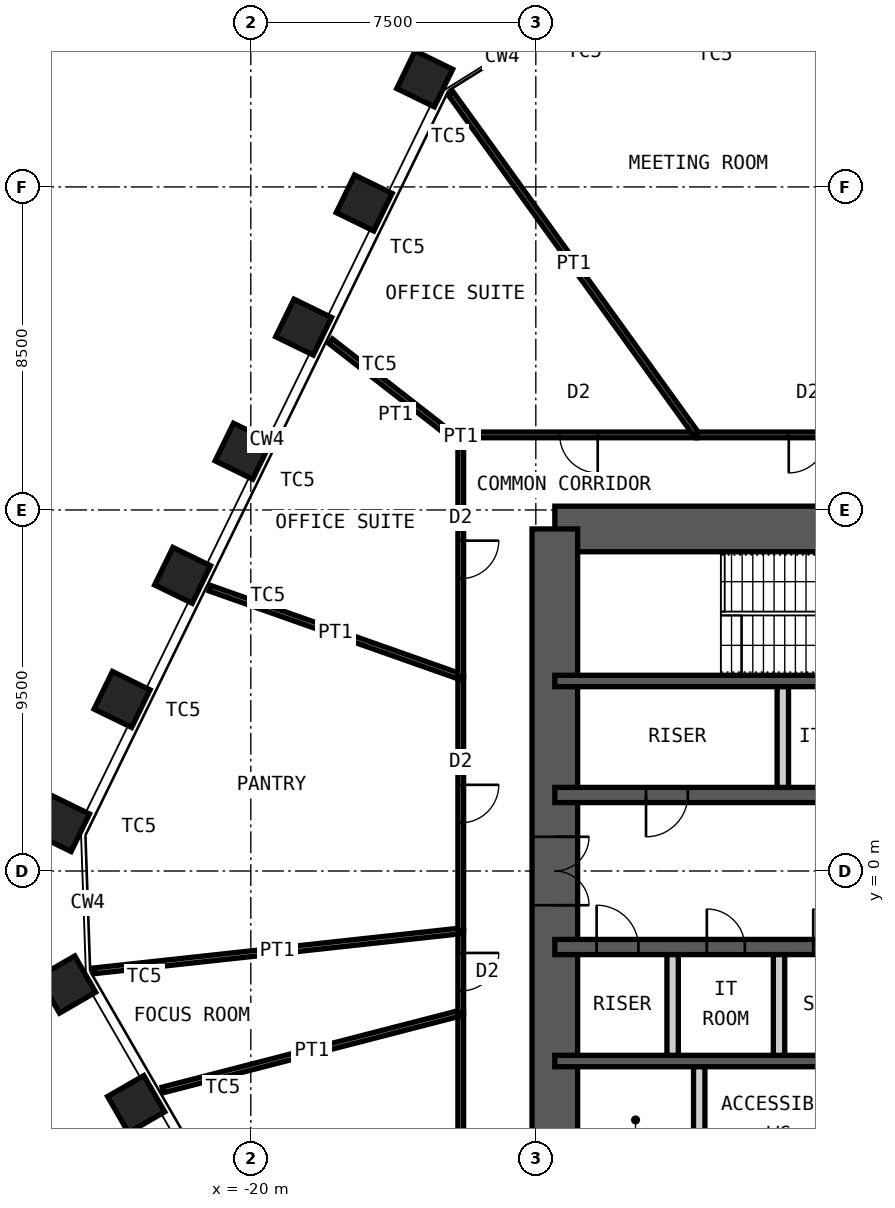
"""IFC4 building model, lengths in metres.
Left out: names, types, materials, properties, quantities, classifications, styles, units other than length and angle.
Written with IfcOpenShell. Run it as: python <this file> out.ifc"""

import sys

from ifc_helpers import new_model, si_unit, direction, frame, frame_2d, origin, origin_2d, place, context, subcontext, project, spatial, rectangle, hollow_rectangle, extrude, element, fill, save


model = new_model("IFC4")
c1 = context("Model", 3, precision=1e-05, world=origin(), true_north=direction((0.0, 1.0)))
c2 = subcontext(c1, "Body", "Model", "MODEL_VIEW")
j1 = project(units=[si_unit("LENGTHUNIT", "METRE"), si_unit("PLANEANGLEUNIT", "RADIAN")], contexts=[c1])
p1 = place(None, origin())
s1 = spatial("IfcSite", under=j1, at=p1, CompositionType="ELEMENT")
p2 = place(p1, origin())
s2 = spatial("IfcBuilding", under=s1, at=p2, CompositionType="ELEMENT")
p3 = place(p2, frame((0.0, 0.0, 201.4)))
s3 = spatial("IfcBuildingStorey", under=s2, at=p3, CompositionType="ELEMENT", Elevation=201.4)
for number, where, z_axis, x_axis in (
    (1, (-23.016, -6.134, 0.0), (0.0, 0.0, 1.0), (0.5, -0.866, 0.0)),
    (2, (-24.833, -2.988, 0.0), (0.0, 0.0, 1.0), (0.5, -0.866, 0.0)),
    (3, (-24.981, 1.248, 0.0), (0.0, 0.0, 1.0), (-0.438, -0.899, 0.0)),
    (4, (-23.388, 4.514, 0.0), (0.0, 0.0, 1.0), (-0.438, -0.899, 0.0)),
    (5, (-21.795, 7.78, 0.0), (0.0, 0.0, 1.0), (-0.438, -0.899, 0.0)),
    (6, (-20.203, 11.045, 0.0), (0.0, 0.0, 1.0), (-0.438, -0.899, 0.0)),
    (7, (-18.61, 14.311, 0.0), (0.0, 0.0, 1.0), (-0.438, -0.899, 0.0)),
    (8, (-17.017, 17.577, 0.0), (0.0, 0.0, 1.0), (-0.438, -0.899, 0.0)),
    (9, (-15.424, 20.843, 0.0), (0.0, 0.0, 1.0), (-0.438, -0.899, 0.0)),
):
    element("IfcColumn", number, at=place(p3, frame(where, z_axis=z_axis, x_axis=x_axis)), inside=s3, PredefinedType="COLUMN", context=c2, shape_type="SweptSolid", body=[
        extrude(hollow_rectangle(XDim=1.1, YDim=1.1, WallThickness=0.07, at=origin_2d()), origin(), (0.0, 0.0, 1.0), 4.2),
    ])
p4 = place(p3, frame((-12.0, 9.0, 0.0), z_axis=(0.0, 0.0, 1.0), x_axis=(1.0, 0.0, 0.0)))
e10 = element("IfcWall", 10, at=p4, inside=s3, PredefinedType="SHEAR", context=c2, shape_type="SweptSolid", body=[
    extrude(rectangle(XDim=24.0, YDim=1.2, at=frame_2d((12.0, 0.0))), origin(), (0.0, 0.0, 1.0), 4.2),
])
p5 = place(p4, frame((10.4, 0.0, 0.0)))
e11 = element("IfcOpeningElement", 11, at=p5, cuts=e10, PredefinedType="OPENING", context=c2, shape_type="SweptSolid", body=[
    extrude(rectangle(XDim=1.0, YDim=2.1, at=frame_2d((0.5, 1.05))), frame((0.0, 0.61, 0.0), z_axis=(0.0, -1.0, 0.0), x_axis=(1.0, 0.0, 0.0)), (0.0, 0.0, 1.0), 1.22),
])
p6 = place(p4, frame((17.6, 0.0, 0.0)))
e12 = element("IfcOpeningElement", 12, at=p6, cuts=e10, PredefinedType="OPENING", context=c2, shape_type="SweptSolid", body=[
    extrude(rectangle(XDim=0.9, YDim=2.1, at=frame_2d((0.45, 1.05))), frame((0.0, 0.61, 0.0), z_axis=(0.0, -1.0, 0.0), x_axis=(1.0, 0.0, 0.0)), (0.0, 0.0, 1.0), 1.22),
])
p7 = place(p4, frame((21.9, 0.0, 0.0)))
e13 = element("IfcOpeningElement", 13, at=p7, cuts=e10, PredefinedType="OPENING", context=c2, shape_type="SweptSolid", body=[
    extrude(rectangle(XDim=0.9, YDim=2.1, at=frame_2d((0.45, 1.05))), frame((0.0, 0.61, 0.0), z_axis=(0.0, -1.0, 0.0), x_axis=(1.0, 0.0, 0.0)), (0.0, 0.0, 1.0), 1.22),
])
p8 = place(p3, frame((-12.0, -9.0, 0.0), z_axis=(0.0, 0.0, 1.0), x_axis=(0.0, 1.0, 0.0)))
e14 = element("IfcWall", 14, at=p8, inside=s3, PredefinedType="SHEAR", context=c2, shape_type="SweptSolid", body=[
    extrude(rectangle(XDim=18.0, YDim=1.2, at=frame_2d((9.0, 0.0))), origin(), (0.0, 0.0, 1.0), 4.2),
])
p9 = place(p8, frame((8.1, 0.0, 0.0)))
e15 = element("IfcOpeningElement", 15, at=p9, cuts=e14, PredefinedType="OPENING", context=c2, shape_type="SweptSolid", body=[
    extrude(rectangle(XDim=1.8, YDim=2.1, at=frame_2d((0.9, 1.05))), frame((0.0, 0.61, 0.0), z_axis=(0.0, -1.0, 0.0), x_axis=(1.0, 0.0, 0.0)), (0.0, 0.0, 1.0), 1.22),
])
p10 = place(p3, frame((-12.0, 5.0, 0.0), z_axis=(0.0, 0.0, 1.0), x_axis=(1.0, 0.0, 0.0)))
e16 = element("IfcWall", 16, at=p10, inside=s3, PredefinedType="SHEAR", context=c2, shape_type="SweptSolid", body=[
    extrude(rectangle(XDim=24.0, YDim=0.3, at=frame_2d((12.0, 0.0))), origin(), (0.0, 0.0, 1.0), 4.2),
])
p11 = place(p3, frame((-12.0, 2.0, 0.0), z_axis=(0.0, 0.0, 1.0), x_axis=(1.0, 0.0, 0.0)))
e17 = element("IfcWall", 17, at=p11, inside=s3, PredefinedType="SHEAR", context=c2, shape_type="SweptSolid", body=[
    extrude(rectangle(XDim=24.0, YDim=0.4, at=frame_2d((12.0, 0.0))), origin(), (0.0, 0.0, 1.0), 4.2),
])
p12 = place(p11, frame((2.4, 0.0, 0.0)))
e18 = element("IfcOpeningElement", 18, at=p12, cuts=e17, PredefinedType="OPENING", context=c2, shape_type="SweptSolid", body=[
    extrude(rectangle(XDim=1.1, YDim=2.1, at=frame_2d((0.55, 1.05))), frame((0.0, 0.21, 0.0), z_axis=(0.0, -1.0, 0.0), x_axis=(1.0, 0.0, 0.0)), (0.0, 0.0, 1.0), 0.42),
])
p13 = place(p11, frame((22.0, 0.0, 0.0)))
e19 = element("IfcOpeningElement", 19, at=p13, cuts=e17, PredefinedType="OPENING", context=c2, shape_type="SweptSolid", body=[
    extrude(rectangle(XDim=1.1, YDim=2.1, at=frame_2d((0.55, 1.05))), frame((0.0, 0.21, 0.0), z_axis=(0.0, -1.0, 0.0), x_axis=(1.0, 0.0, 0.0)), (0.0, 0.0, 1.0), 0.42),
])
p14 = place(p11, frame((10.15, 0.0, 0.0)))
e20 = element("IfcOpeningElement", 20, at=p14, cuts=e17, PredefinedType="OPENING", context=c2, shape_type="SweptSolid", body=[
    extrude(rectangle(XDim=1.0, YDim=2.1, at=frame_2d((0.5, 1.05))), frame((0.0, 0.21, 0.0), z_axis=(0.0, -1.0, 0.0), x_axis=(1.0, 0.0, 0.0)), (0.0, 0.0, 1.0), 0.42),
])
p15 = place(p11, frame((6.9, 0.0, 0.0)))
e21 = element("IfcOpeningElement", 21, at=p15, cuts=e17, PredefinedType="OPENING", context=c2, shape_type="SweptSolid", body=[
    extrude(rectangle(XDim=1.0, YDim=2.1, at=frame_2d((0.5, 1.05))), frame((0.0, 0.21, 0.0), z_axis=(0.0, -1.0, 0.0), x_axis=(1.0, 0.0, 0.0)), (0.0, 0.0, 1.0), 0.42),
])
p16 = place(p11, frame((13.35, 0.0, 0.0)))
e22 = element("IfcOpeningElement", 22, at=p16, cuts=e17, PredefinedType="OPENING", context=c2, shape_type="SweptSolid", body=[
    extrude(rectangle(XDim=1.1, YDim=2.4, at=frame_2d((0.55, 1.2))), frame((0.0, 0.21, 0.0), z_axis=(0.0, -1.0, 0.0), x_axis=(1.0, 0.0, 0.0)), (0.0, 0.0, 1.0), 0.42),
])
p17 = place(p11, frame((16.15, 0.0, 0.0)))
e23 = element("IfcOpeningElement", 23, at=p17, cuts=e17, PredefinedType="OPENING", context=c2, shape_type="SweptSolid", body=[
    extrude(rectangle(XDim=1.1, YDim=2.4, at=frame_2d((0.55, 1.2))), frame((0.0, 0.21, 0.0), z_axis=(0.0, -1.0, 0.0), x_axis=(1.0, 0.0, 0.0)), (0.0, 0.0, 1.0), 0.42),
])
p18 = place(p11, frame((18.95, 0.0, 0.0)))
e24 = element("IfcOpeningElement", 24, at=p18, cuts=e17, PredefinedType="OPENING", context=c2, shape_type="SweptSolid", body=[
    extrude(rectangle(XDim=1.1, YDim=2.4, at=frame_2d((0.55, 1.2))), frame((0.0, 0.21, 0.0), z_axis=(0.0, -1.0, 0.0), x_axis=(1.0, 0.0, 0.0)), (0.0, 0.0, 1.0), 0.42),
])
p19 = place(p3, frame((-12.0, -2.0, 0.0), z_axis=(0.0, 0.0, 1.0), x_axis=(1.0, 0.0, 0.0)))
e25 = element("IfcWall", 25, at=p19, inside=s3, PredefinedType="SHEAR", context=c2, shape_type="SweptSolid", body=[
    extrude(rectangle(XDim=24.0, YDim=0.4, at=frame_2d((12.0, 0.0))), origin(), (0.0, 0.0, 1.0), 4.2),
])
p20 = place(p19, frame((1.1, 0.0, 0.0)))
e26 = element("IfcOpeningElement", 26, at=p20, cuts=e25, PredefinedType="OPENING", context=c2, shape_type="SweptSolid", body=[
    extrude(rectangle(XDim=1.1, YDim=2.1, at=frame_2d((0.55, 1.05))), frame((0.0, 0.21, 0.0), z_axis=(0.0, -1.0, 0.0), x_axis=(1.0, 0.0, 0.0)), (0.0, 0.0, 1.0), 0.42),
])
p21 = place(p19, frame((13.55, 0.0, 0.0)))
e27 = element("IfcOpeningElement", 27, at=p21, cuts=e25, PredefinedType="OPENING", context=c2, shape_type="SweptSolid", body=[
    extrude(rectangle(XDim=1.1, YDim=2.1, at=frame_2d((0.55, 1.05))), frame((0.0, 0.21, 0.0), z_axis=(0.0, -1.0, 0.0), x_axis=(1.0, 0.0, 0.0)), (0.0, 0.0, 1.0), 0.42),
])
p22 = place(p19, frame((20.7, 0.0, 0.0)))
e28 = element("IfcOpeningElement", 28, at=p22, cuts=e25, PredefinedType="OPENING", context=c2, shape_type="SweptSolid", body=[
    extrude(rectangle(XDim=1.1, YDim=2.1, at=frame_2d((0.55, 1.05))), frame((0.0, 0.21, 0.0), z_axis=(0.0, -1.0, 0.0), x_axis=(1.0, 0.0, 0.0)), (0.0, 0.0, 1.0), 0.42),
])
p23 = place(p19, frame((4.0, 0.0, 0.0)))
e29 = element("IfcOpeningElement", 29, at=p23, cuts=e25, PredefinedType="OPENING", context=c2, shape_type="SweptSolid", body=[
    extrude(rectangle(XDim=1.0, YDim=2.1, at=frame_2d((0.5, 1.05))), frame((0.0, 0.21, 0.0), z_axis=(0.0, -1.0, 0.0), x_axis=(1.0, 0.0, 0.0)), (0.0, 0.0, 1.0), 0.42),
])
p24 = place(p19, frame((6.8, 0.0, 0.0)))
e30 = element("IfcOpeningElement", 30, at=p24, cuts=e25, PredefinedType="OPENING", context=c2, shape_type="SweptSolid", body=[
    extrude(rectangle(XDim=1.0, YDim=2.1, at=frame_2d((0.5, 1.05))), frame((0.0, 0.21, 0.0), z_axis=(0.0, -1.0, 0.0), x_axis=(1.0, 0.0, 0.0)), (0.0, 0.0, 1.0), 0.42),
])
p25 = place(p3, frame((-12.0, -5.0, 0.0), z_axis=(0.0, 0.0, 1.0), x_axis=(1.0, 0.0, 0.0)))
e31 = element("IfcWall", 31, at=p25, inside=s3, PredefinedType="SHEAR", context=c2, shape_type="SweptSolid", body=[
    extrude(rectangle(XDim=24.0, YDim=0.3, at=frame_2d((12.0, 0.0))), origin(), (0.0, 0.0, 1.0), 4.2),
])
for number, where, z_axis, x_axis in (
    (32, (-6.0, 2.2, 0.0), (0.0, 0.0, 1.0), (0.0, 1.0, 0.0)),
    (33, (-8.9, -4.85, 0.0), (0.0, 0.0, 1.0), (0.0, 1.0, 0.0)),
    (34, (-6.1, -4.85, 0.0), (0.0, 0.0, 1.0), (0.0, 1.0, 0.0)),
):
    element("IfcWall", number, at=place(p3, frame(where, z_axis=z_axis, x_axis=x_axis)), inside=s3, PredefinedType="PARTITIONING", context=c2, shape_type="SweptSolid", body=[
        extrude(rectangle(XDim=2.65, YDim=0.3, at=frame_2d((1.325, 0.0))), origin(), (0.0, 0.0, 1.0), 3.98),
    ])
p26 = place(p3, frame((-8.2, -9.0, 0.0), z_axis=(0.0, 0.0, 1.0), x_axis=(0.0, 1.0, 0.0)))
e35 = element("IfcWall", 35, at=p26, inside=s3, PredefinedType="PARTITIONING", context=c2, shape_type="SweptSolid", body=[
    extrude(rectangle(XDim=3.85, YDim=0.3, at=frame_2d((1.925, 0.0))), origin(), (0.0, 0.0, 1.0), 3.98),
])
p27 = place(p3, frame((-14.475, -11.475, 0.0), z_axis=(0.0, 0.0, 1.0), x_axis=(0.0, 1.0, 0.0)))
e36 = element("IfcWall", 36, at=p27, inside=s3, PredefinedType="PARTITIONING", context=c2, shape_type="SweptSolid", body=[
    extrude(rectangle(XDim=7.739, YDim=0.15, at=frame_2d((3.87, 0.0))), origin(), (0.0, 0.0, 1.0), 4.03),
])
p28 = place(p3, frame((-22.313, -5.759, 0.0), z_axis=(0.0, 0.0, 1.0), x_axis=(0.968265788926, 0.249922712042, 0.0)))
e37 = element("IfcWall", 37, at=p28, inside=s3, PredefinedType="PARTITIONING", context=c2, shape_type="SweptSolid", body=[
    extrude(rectangle(XDim=8.095, YDim=0.15, at=frame_2d((4.048, 0.0))), origin(), (0.0, 0.0, 1.0), 3.43),
])
p29 = place(p3, frame((-14.475, -3.736, 0.0), z_axis=(0.0, 0.0, 1.0), x_axis=(0.0, 1.0, 0.0)))
e38 = element("IfcWall", 38, at=p29, inside=s3, PredefinedType="PARTITIONING", context=c2, shape_type="SweptSolid", body=[
    extrude(rectangle(XDim=2.16, YDim=0.15, at=frame_2d((1.08, 0.0))), origin(), (0.0, 0.0, 1.0), 4.03),
])
p30 = place(p29, frame((0.58, 0.0, 0.0)))
e39 = element("IfcOpeningElement", 39, at=p30, cuts=e38, PredefinedType="OPENING", context=c2, shape_type="SweptSolid", body=[
    extrude(rectangle(XDim=1.0, YDim=2.4, at=frame_2d((0.5, 1.2))), frame((0.0, 0.085, 0.0), z_axis=(0.0, -1.0, 0.0), x_axis=(1.0, 0.0, 0.0)), (0.0, 0.0, 1.0), 0.17),
])
p31 = place(p3, frame((-24.128, -2.627, 0.0), z_axis=(0.0, 0.0, 1.0), x_axis=(0.994126892449, 0.108220708326, 0.0)))
e40 = element("IfcWall", 40, at=p31, inside=s3, PredefinedType="PARTITIONING", context=c2, shape_type="SweptSolid", body=[
    extrude(rectangle(XDim=9.71, YDim=0.15, at=frame_2d((4.855, 0.0))), origin(), (0.0, 0.0, 1.0), 2.93),
])
p32 = place(p3, frame((-14.475, -1.576, 0.0), z_axis=(0.0, 0.0, 1.0), x_axis=(0.0, 1.0, 0.0)))
e41 = element("IfcWall", 41, at=p32, inside=s3, PredefinedType="PARTITIONING", context=c2, shape_type="SweptSolid", body=[
    extrude(rectangle(XDim=6.686, YDim=0.15, at=frame_2d((3.343, 0.0))), origin(), (0.0, 0.0, 1.0), 4.03),
])
p33 = place(p32, frame((2.843, 0.0, 0.0)))
e42 = element("IfcOpeningElement", 42, at=p33, cuts=e41, PredefinedType="OPENING", context=c2, shape_type="SweptSolid", body=[
    extrude(rectangle(XDim=1.0, YDim=2.4, at=frame_2d((0.5, 1.2))), frame((0.0, 0.085, 0.0), z_axis=(0.0, -1.0, 0.0), x_axis=(1.0, 0.0, 0.0)), (0.0, 0.0, 1.0), 0.17),
])
p34 = place(p3, frame((-21.072, 7.439, 0.0), z_axis=(0.0, 0.0, 1.0), x_axis=(0.94295553867, -0.332918686907, 0.0)))
e43 = element("IfcWall", 43, at=p34, inside=s3, PredefinedType="PARTITIONING", context=c2, shape_type="SweptSolid", body=[
    extrude(rectangle(XDim=6.996, YDim=0.15, at=frame_2d((3.498, 0.0))), origin(), (0.0, 0.0, 1.0), 3.43),
])
p35 = place(p3, frame((-14.475, 5.11, 0.0), z_axis=(0.0, 0.0, 1.0), x_axis=(0.0, 1.0, 0.0)))
e44 = element("IfcWall", 44, at=p35, inside=s3, PredefinedType="PARTITIONING", context=c2, shape_type="SweptSolid", body=[
    extrude(rectangle(XDim=6.164, YDim=0.15, at=frame_2d((3.082, 0.0))), origin(), (0.0, 0.0, 1.0), 4.03),
])
p36 = place(p35, frame((2.582, 0.0, 0.0)))
e45 = element("IfcOpeningElement", 45, at=p36, cuts=e44, PredefinedType="OPENING", context=c2, shape_type="SweptSolid", body=[
    extrude(rectangle(XDim=1.0, YDim=2.4, at=frame_2d((0.5, 1.2))), frame((0.0, 0.085, 0.0), z_axis=(0.0, -1.0, 0.0), x_axis=(1.0, 0.0, 0.0)), (0.0, 0.0, 1.0), 0.17),
])
p37 = place(p3, frame((-17.902, 13.943, 0.0), z_axis=(0.0, 0.0, 1.0), x_axis=(0.788919197717, -0.614496948303, 0.0)))
e46 = element("IfcWall", 46, at=p37, inside=s3, PredefinedType="PARTITIONING", context=c2, shape_type="SweptSolid", body=[
    extrude(rectangle(XDim=4.343, YDim=0.15, at=frame_2d((2.172, 0.0))), origin(), (0.0, 0.0, 1.0), 3.43),
])
p38 = place(p3, frame((-14.475, 11.369, 0.0), z_axis=(0.0, 0.0, 1.0), x_axis=(0.0, 1.0, 0.0)))
e47 = element("IfcWall", 47, at=p38, inside=s3, PredefinedType="PARTITIONING", context=c2, shape_type="SweptSolid", body=[
    extrude(rectangle(XDim=0.106, YDim=0.15, at=frame_2d((0.053, 0.0))), origin(), (0.0, 0.0, 1.0), 4.03),
])
p39 = place(p3, frame((-14.475, 11.475, 0.0), z_axis=(0.0, 0.0, 1.0), x_axis=(1.0, 0.0, 0.0)))
e48 = element("IfcWall", 48, at=p39, inside=s3, PredefinedType="PARTITIONING", context=c2, shape_type="SweptSolid", body=[
    extrude(rectangle(XDim=6.208, YDim=0.15, at=frame_2d((3.104, 0.0))), origin(), (0.0, 0.0, 1.0), 4.03),
])
p40 = place(p39, frame((2.604, 0.0, 0.0)))
e49 = element("IfcOpeningElement", 49, at=p40, cuts=e48, PredefinedType="OPENING", context=c2, shape_type="SweptSolid", body=[
    extrude(rectangle(XDim=1.0, YDim=2.4, at=frame_2d((0.5, 1.2))), frame((0.0, 0.085, 0.0), z_axis=(0.0, -1.0, 0.0), x_axis=(1.0, 0.0, 0.0)), (0.0, 0.0, 1.0), 0.17),
])
p41 = place(p3, frame((-14.737, 20.455, 0.0), z_axis=(0.0, 0.0, 1.0), x_axis=(0.584547025688, -0.811359830629, 0.0)))
e50 = element("IfcWall", 50, at=p41, inside=s3, PredefinedType="PARTITIONING", context=c2, shape_type="SweptSolid", body=[
    extrude(rectangle(XDim=11.068, YDim=0.15, at=frame_2d((5.534, 0.0))), origin(), (0.0, 0.0, 1.0), 2.93),
])
p42 = place(p3, frame((-8.267, 11.475, 0.0), z_axis=(0.0, 0.0, 1.0), x_axis=(1.0, 0.0, 0.0)))
e51 = element("IfcWall", 51, at=p42, inside=s3, PredefinedType="PARTITIONING", context=c2, shape_type="SweptSolid", body=[
    extrude(rectangle(XDim=5.846, YDim=0.15, at=frame_2d((2.923, 0.0))), origin(), (0.0, 0.0, 1.0), 4.03),
])
p43 = place(p42, frame((2.423, 0.0, 0.0)))
e52 = element("IfcOpeningElement", 52, at=p43, cuts=e51, PredefinedType="OPENING", context=c2, shape_type="SweptSolid", body=[
    extrude(rectangle(XDim=1.0, YDim=2.4, at=frame_2d((0.5, 1.2))), frame((0.0, 0.085, 0.0), z_axis=(0.0, -1.0, 0.0), x_axis=(1.0, 0.0, 0.0)), (0.0, 0.0, 1.0), 0.17),
])
p44 = place(p12, origin())
e53 = element("IfcDoor", 53, at=p44, inside=s3, OperationType="SINGLE_SWING_LEFT", PredefinedType="DOOR", context=c2, shape_type="SweptSolid", body=[
    extrude(rectangle(XDim=1.1, YDim=2.1, at=frame_2d((0.55, 1.05))), frame((0.0, 0.025, 0.0), z_axis=(0.0, -1.0, 0.0), x_axis=(1.0, 0.0, 0.0)), (0.0, 0.0, 1.0), 0.05),
])
fill(e18, e53)
p45 = place(p20, origin())
e54 = element("IfcDoor", 54, at=p45, inside=s3, OperationType="SINGLE_SWING_RIGHT", PredefinedType="DOOR", context=c2, shape_type="SweptSolid", body=[
    extrude(rectangle(XDim=1.1, YDim=2.1, at=frame_2d((0.55, 1.05))), frame((0.0, 0.025, 0.0), z_axis=(0.0, -1.0, 0.0), x_axis=(1.0, 0.0, 0.0)), (0.0, 0.0, 1.0), 0.05),
])
fill(e26, e54)
p46 = place(p9, origin())
e55 = element("IfcDoor", 55, at=p46, inside=s3, OperationType="DOUBLE_DOOR_DOUBLE_SWING", PredefinedType="DOOR", context=c2, shape_type="SweptSolid", body=[
    extrude(rectangle(XDim=1.8, YDim=2.1, at=frame_2d((0.9, 1.05))), frame((0.0, 0.025, 0.0), z_axis=(0.0, -1.0, 0.0), x_axis=(1.0, 0.0, 0.0)), (0.0, 0.0, 1.0), 0.05),
])
fill(e15, e55)
p47 = place(p23, origin())
e56 = element("IfcDoor", 56, at=p47, inside=s3, OperationType="SINGLE_SWING_RIGHT", PredefinedType="DOOR", context=c2, shape_type="SweptSolid", body=[
    extrude(rectangle(XDim=1.0, YDim=2.1, at=frame_2d((0.5, 1.05))), frame((0.0, 0.025, 0.0), z_axis=(0.0, -1.0, 0.0), x_axis=(1.0, 0.0, 0.0)), (0.0, 0.0, 1.0), 0.05),
])
fill(e29, e56)
p48 = place(p24, origin())
e57 = element("IfcDoor", 57, at=p48, inside=s3, OperationType="SINGLE_SWING_RIGHT", PredefinedType="DOOR", context=c2, shape_type="SweptSolid", body=[
    extrude(rectangle(XDim=1.0, YDim=2.1, at=frame_2d((0.5, 1.05))), frame((0.0, 0.025, 0.0), z_axis=(0.0, -1.0, 0.0), x_axis=(1.0, 0.0, 0.0)), (0.0, 0.0, 1.0), 0.05),
])
fill(e30, e57)
p49 = place(p30, origin())
e58 = element("IfcDoor", 58, at=p49, inside=s3, OperationType="SINGLE_SWING_RIGHT", PredefinedType="DOOR", context=c2, shape_type="SweptSolid", body=[
    extrude(rectangle(XDim=1.0, YDim=2.4, at=frame_2d((0.5, 1.2))), frame((0.0, 0.025, 0.0), z_axis=(0.0, -1.0, 0.0), x_axis=(1.0, 0.0, 0.0)), (0.0, 0.0, 1.0), 0.05),
])
fill(e39, e58)
p50 = place(p33, origin())
e59 = element("IfcDoor", 59, at=p50, inside=s3, OperationType="SINGLE_SWING_RIGHT", PredefinedType="DOOR", context=c2, shape_type="SweptSolid", body=[
    extrude(rectangle(XDim=1.0, YDim=2.4, at=frame_2d((0.5, 1.2))), frame((0.0, 0.025, 0.0), z_axis=(0.0, -1.0, 0.0), x_axis=(1.0, 0.0, 0.0)), (0.0, 0.0, 1.0), 0.05),
])
fill(e42, e59)
p51 = place(p36, origin())
e60 = element("IfcDoor", 60, at=p51, inside=s3, OperationType="SINGLE_SWING_RIGHT", PredefinedType="DOOR", context=c2, shape_type="SweptSolid", body=[
    extrude(rectangle(XDim=1.0, YDim=2.4, at=frame_2d((0.5, 1.2))), frame((0.0, 0.025, 0.0), z_axis=(0.0, -1.0, 0.0), x_axis=(1.0, 0.0, 0.0)), (0.0, 0.0, 1.0), 0.05),
])
fill(e45, e60)
p52 = place(p40, origin())
e61 = element("IfcDoor", 61, at=p52, inside=s3, OperationType="SINGLE_SWING_RIGHT", PredefinedType="DOOR", context=c2, shape_type="SweptSolid", body=[
    extrude(rectangle(XDim=1.0, YDim=2.4, at=frame_2d((0.5, 1.2))), frame((0.0, 0.025, 0.0), z_axis=(0.0, -1.0, 0.0), x_axis=(1.0, 0.0, 0.0)), (0.0, 0.0, 1.0), 0.05),
])
fill(e49, e61)
p53 = place(p43, origin())
e62 = element("IfcDoor", 62, at=p53, inside=s3, OperationType="SINGLE_SWING_LEFT", PredefinedType="DOOR", context=c2, shape_type="SweptSolid", body=[
    extrude(rectangle(XDim=1.0, YDim=2.4, at=frame_2d((0.5, 1.2))), frame((0.0, 0.025, 0.0), z_axis=(0.0, -1.0, 0.0), x_axis=(1.0, 0.0, 0.0)), (0.0, 0.0, 1.0), 0.05),
])
fill(e52, e62)
save(model, sys.argv[1])
